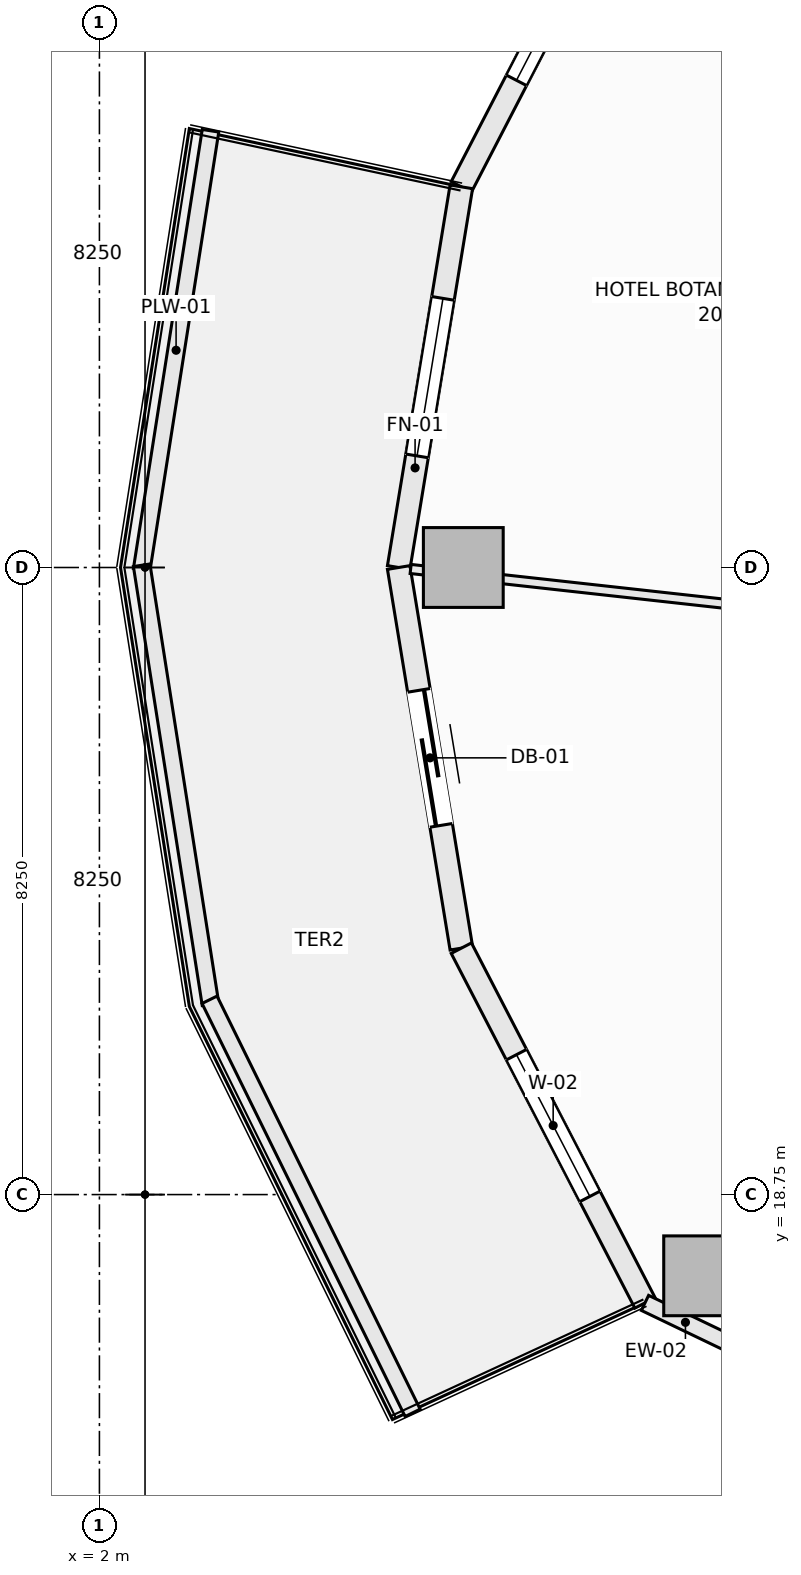
"""IFC4 building model, lengths in metres.
Left out: names, types, materials, properties, quantities, classifications, styles, units other than length and angle.
Written with IfcOpenShell. Run it as: python <this file> out.ifc"""

import sys

from ifc_helpers import new_model, si_unit, direction, frame, frame_2d, origin, origin_2d, place, context, subcontext, project, spatial, rectangle, extrude, element, fill, save


model = new_model("IFC4")
c1 = context("Model", 3, precision=1e-05, world=origin(), true_north=direction((0.0, 1.0)))
c2 = subcontext(c1, "Body", "Model", "MODEL_VIEW")
j1 = project(units=[si_unit("LENGTHUNIT", "METRE"), si_unit("PLANEANGLEUNIT", "RADIAN")], contexts=[c1])
p1 = place(None, origin())
s1 = spatial("IfcSite", under=j1, at=p1, CompositionType="ELEMENT")
p2 = place(p1, origin())
s2 = spatial("IfcBuilding", under=s1, at=p2, CompositionType="ELEMENT")
p3 = place(p2, frame((0.0, 0.0, 115.5)))
s3 = spatial("IfcBuildingStorey", under=s2, at=p3, CompositionType="ELEMENT", Elevation=115.5)
for number, where, z_axis, x_axis in (
    (1, (6.788, 27.0, -0.27), (0.0, 0.0, 1.0), (1.0, 0.0, 0.0)),
    (2, (9.95, 17.681, -0.27), (0.0, 0.0, 1.0), (1.0, 0.0, 0.0)),
):
    element("IfcColumn", number, at=place(p3, frame(where, z_axis=z_axis, x_axis=x_axis)), inside=s3, PredefinedType="COLUMN", context=c2, shape_type="SweptSolid", body=[
        extrude(rectangle(XDim=1.05, YDim=1.05, at=origin_2d()), origin(), (0.0, 0.0, 1.0), 3.4),
    ])
p4 = place(p3, frame((6.762, 32.008, 0.0), z_axis=(0.0, 0.0, 1.0), x_axis=(0.459767899643, 0.888039119892, 0.0)))
e3 = element("IfcWall", 3, at=p4, inside=s3, PredefinedType="SOLIDWALL", context=c2, shape_type="SweptSolid", body=[
    extrude(rectangle(XDim=5.255, YDim=0.3, at=frame_2d((2.628, 0.0))), origin(), (0.0, 0.0, 1.0), 2.653),
])
p5 = place(p4, frame((1.578, 0.0, 0.74)))
e4 = element("IfcOpeningElement", 4, at=p5, cuts=e3, PredefinedType="OPENING", context=c2, shape_type="SweptSolid", body=[
    extrude(rectangle(XDim=2.1, YDim=1.7, at=frame_2d((1.05, 0.85))), frame((0.0, 0.16, 0.0), z_axis=(0.0, -1.0, 0.0), x_axis=(1.0, 0.0, 0.0)), (0.0, 0.0, 1.0), 0.32),
])
p6 = place(p3, frame((5.938, 27.0, 0.0), z_axis=(0.0, 0.0, 1.0), x_axis=(0.162393944769, 0.986726003864, 0.0)))
e5 = element("IfcWall", 5, at=p6, inside=s3, PredefinedType="SOLIDWALL", context=c2, shape_type="SweptSolid", body=[
    extrude(rectangle(XDim=5.075, YDim=0.3, at=frame_2d((2.538, 0.0))), origin(), (0.0, 0.0, 1.0), 2.653),
])
p7 = place(p6, frame((1.488, 0.0, 0.74)))
e6 = element("IfcOpeningElement", 6, at=p7, cuts=e5, PredefinedType="OPENING", context=c2, shape_type="SweptSolid", body=[
    extrude(rectangle(XDim=2.1, YDim=1.7, at=frame_2d((1.05, 0.85))), frame((0.0, 0.16, 0.0), z_axis=(0.0, -1.0, 0.0), x_axis=(1.0, 0.0, 0.0)), (0.0, 0.0, 1.0), 0.32),
])
p8 = place(p3, frame((5.938, 27.0, 0.0), z_axis=(0.0, 0.0, 1.0), x_axis=(0.162393944769, -0.986726003864, 0.0)))
e7 = element("IfcWall", 7, at=p8, inside=s3, PredefinedType="SOLIDWALL", context=c2, shape_type="SweptSolid", body=[
    extrude(rectangle(XDim=5.075, YDim=0.3, at=frame_2d((2.538, 0.0))), origin(), (0.0, 0.0, 1.0), 2.653),
])
p9 = place(p8, frame((1.638, 0.0, 0.0)))
e8 = element("IfcOpeningElement", 8, at=p9, cuts=e7, PredefinedType="OPENING", context=c2, shape_type="SweptSolid", body=[
    extrude(rectangle(XDim=1.8, YDim=2.25, at=frame_2d((0.9, 1.125))), frame((0.0, 0.16, 0.0), z_axis=(0.0, -1.0, 0.0), x_axis=(1.0, 0.0, 0.0)), (0.0, 0.0, 1.0), 0.32),
])
p10 = place(p3, frame((6.762, 21.992, 0.0), z_axis=(0.0, 0.0, 1.0), x_axis=(0.459767899643, -0.888039119892, 0.0)))
e9 = element("IfcWall", 9, at=p10, inside=s3, PredefinedType="SOLIDWALL", context=c2, shape_type="SweptSolid", body=[
    extrude(rectangle(XDim=5.255, YDim=0.3, at=frame_2d((2.628, 0.0))), origin(), (0.0, 0.0, 1.0), 2.653),
])
p11 = place(p10, frame((1.578, 0.0, 0.74)))
e10 = element("IfcOpeningElement", 10, at=p11, cuts=e9, PredefinedType="OPENING", context=c2, shape_type="SweptSolid", body=[
    extrude(rectangle(XDim=2.1, YDim=1.7, at=frame_2d((1.05, 0.85))), frame((0.0, 0.16, 0.0), z_axis=(0.0, -1.0, 0.0), x_axis=(1.0, 0.0, 0.0)), (0.0, 0.0, 1.0), 0.32),
])
p12 = place(p3, frame((9.178, 17.325, 0.0), z_axis=(0.0, 0.0, 1.0), x_axis=(0.901426247285, -0.432932697664, 0.0)))
e11 = element("IfcWall", 11, at=p12, inside=s3, PredefinedType="SOLIDWALL", context=c2, shape_type="SweptSolid", body=[
    extrude(rectangle(XDim=1.181, YDim=0.22, at=frame_2d((0.59, 0.0))), origin(), (0.0, 0.0, 1.0), 2.653),
])
for number, where, z_axis, x_axis in (
    (12, (2.556, 26.971, 0.0), (0.0, 0.0, 1.0), (0.155, 0.988, 0.0)),
    (13, (2.556, 27.029, 0.0), (0.0, 0.0, 1.0), (0.155, -0.988, 0.0)),
):
    element("IfcWall", number, at=place(p3, frame(where, z_axis=z_axis, x_axis=x_axis)), inside=s3, PredefinedType="PARAPET", context=c2, shape_type="SweptSolid", body=[
        extrude(rectangle(XDim=5.846, YDim=0.22, at=frame_2d((2.923, 0.0))), origin(), (0.0, 0.0, 1.0), 0.52),
    ])
p13 = place(p3, frame((3.449, 21.313, 0.0), z_axis=(0.0, 0.0, 1.0), x_axis=(0.441269631716, -0.897374566235, 0.0)))
e14 = element("IfcWall", 14, at=p13, inside=s3, PredefinedType="PARAPET", context=c2, shape_type="SweptSolid", body=[
    extrude(rectangle(XDim=6.056, YDim=0.22, at=frame_2d((3.028, 0.0))), origin(), (0.0, 0.0, 1.0), 0.52),
])
p14 = place(p3, frame((6.095, 26.981, 0.0), z_axis=(0.0, 0.0, 1.0), x_axis=(0.993917127708, -0.11013057363, 0.0)))
e15 = element("IfcWall", 15, at=p14, inside=s3, PredefinedType="PARTITIONING", context=c2, shape_type="SweptSolid", body=[
    extrude(rectangle(XDim=8.103, YDim=0.12, at=frame_2d((4.051, 0.0))), origin(), (0.0, 0.0, 1.0), 2.505),
])
p15 = place(p5, origin())
e16 = element("IfcWindow", 16, at=p15, inside=s3, PartitioningType="SINGLE_PANEL", PredefinedType="WINDOW", context=c2, shape_type="SweptSolid", body=[
    extrude(rectangle(XDim=2.1, YDim=1.7, at=frame_2d((1.05, 0.85))), frame((0.0, 0.03, 0.0), z_axis=(0.0, -1.0, 0.0), x_axis=(1.0, 0.0, 0.0)), (0.0, 0.0, 1.0), 0.06),
])
fill(e4, e16)
p16 = place(p7, origin())
e17 = element("IfcWindow", 17, at=p16, inside=s3, PartitioningType="SINGLE_PANEL", PredefinedType="WINDOW", context=c2, shape_type="SweptSolid", body=[
    extrude(rectangle(XDim=2.1, YDim=1.7, at=frame_2d((1.05, 0.85))), frame((0.0, 0.03, 0.0), z_axis=(0.0, -1.0, 0.0), x_axis=(1.0, 0.0, 0.0)), (0.0, 0.0, 1.0), 0.06),
])
fill(e6, e17)
p17 = place(p9, frame((1.8, 0.0, 0.0), z_axis=(0.0, 0.0, 1.0), x_axis=(-1.0, 0.0, 0.0)))
e18 = element("IfcDoor", 18, at=p17, inside=s3, OperationType="SLIDING_TO_LEFT", PredefinedType="DOOR", context=c2, shape_type="SweptSolid", body=[
    extrude(rectangle(XDim=1.8, YDim=2.25, at=frame_2d((0.9, 1.125))), frame((0.0, 0.025, 0.0), z_axis=(0.0, -1.0, 0.0), x_axis=(1.0, 0.0, 0.0)), (0.0, 0.0, 1.0), 0.05),
])
fill(e8, e18)
p18 = place(p11, origin())
e19 = element("IfcWindow", 19, at=p18, inside=s3, PartitioningType="SINGLE_PANEL", PredefinedType="WINDOW", context=c2, shape_type="SweptSolid", body=[
    extrude(rectangle(XDim=2.1, YDim=1.7, at=frame_2d((1.05, 0.85))), frame((0.0, 0.03, 0.0), z_axis=(0.0, -1.0, 0.0), x_axis=(1.0, 0.0, 0.0)), (0.0, 0.0, 1.0), 0.06),
])
fill(e10, e19)
save(model, sys.argv[1])
